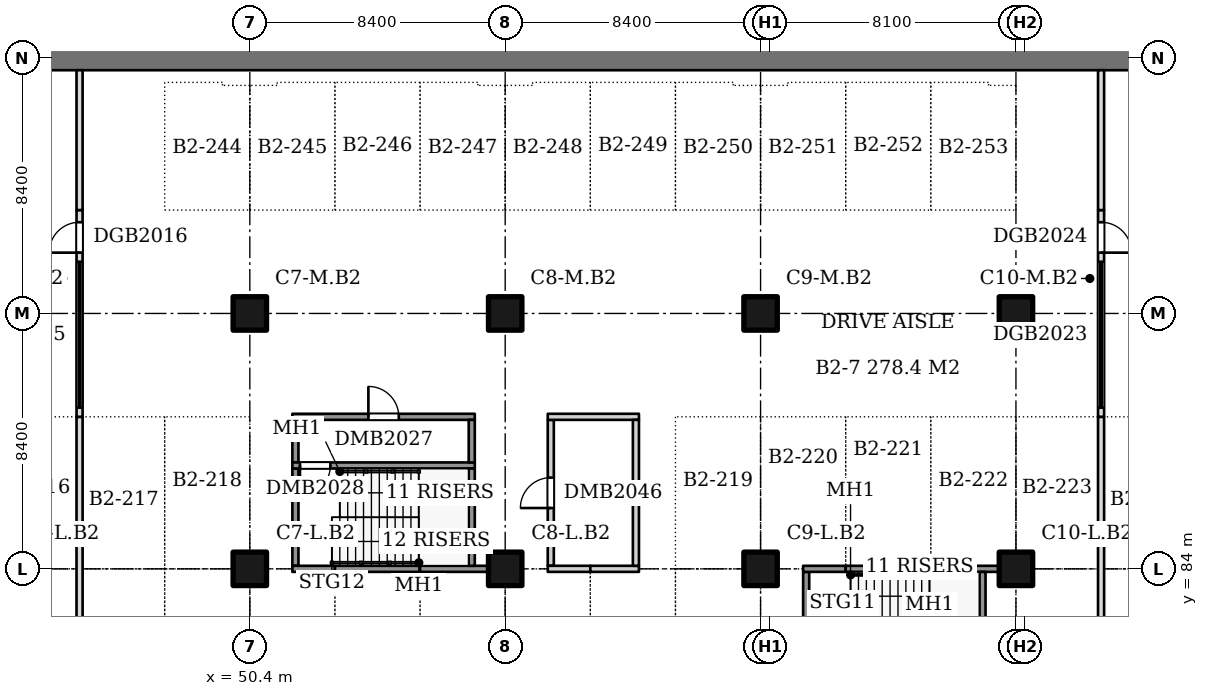
"""IFC4 building model, lengths in metres.
Left out: names, types, materials, properties, quantities, classifications, styles, units other than length and angle.
Written with IfcOpenShell. Run it as: python <this file> out.ifc"""

import sys

from ifc_helpers import new_model, si_unit, direction, frame, frame_2d, origin, origin_2d, place, context, subcontext, project, spatial, rectangle, extrude, element, fill, save


model = new_model("IFC4")
c1 = context("Model", 3, precision=1e-05, world=origin(), true_north=direction((0.0, 1.0)))
c2 = subcontext(c1, "Body", "Model", "MODEL_VIEW")
j1 = project(units=[si_unit("LENGTHUNIT", "METRE"), si_unit("PLANEANGLEUNIT", "RADIAN")], contexts=[c1])
p1 = place(None, origin())
s1 = spatial("IfcSite", under=j1, at=p1, CompositionType="ELEMENT")
p2 = place(p1, origin())
s2 = spatial("IfcBuilding", under=s1, at=p2, CompositionType="ELEMENT")
p3 = place(p2, frame((0.0, 0.0, -8.0)))
s3 = spatial("IfcBuildingStorey", under=s2, at=p3, CompositionType="ELEMENT", Elevation=-8.0)
p4 = place(p3, frame((-8.8, 100.8, 0.0), z_axis=(0.0, 0.0, 1.0), x_axis=(1.0, 0.0, 0.0)))
e1 = element("IfcWall", 1, at=p4, inside=s3, PredefinedType="SOLIDWALL", context=c2, shape_type="SweptSolid", body=[
    extrude(rectangle(XDim=135.2, YDim=0.8, at=frame_2d((67.6, 0.0))), origin(), (0.0, 0.0, 1.0), 3.7),
])
for number, where, z_axis, x_axis in (
    (2, (50.4, 84.0, 0.0), (0.0, 0.0, 1.0), (1.0, 0.0, 0.0)),
    (3, (50.4, 92.4, 0.0), (0.0, 0.0, 1.0), (1.0, 0.0, 0.0)),
    (4, (58.8, 84.0, 0.0), (0.0, 0.0, 1.0), (1.0, 0.0, 0.0)),
    (5, (58.8, 92.4, 0.0), (0.0, 0.0, 1.0), (1.0, 0.0, 0.0)),
    (6, (67.2, 84.0, 0.0), (0.0, 0.0, 1.0), (1.0, 0.0, 0.0)),
    (7, (67.2, 92.4, 0.0), (0.0, 0.0, 1.0), (1.0, 0.0, 0.0)),
    (8, (75.6, 84.0, 0.0), (0.0, 0.0, 1.0), (1.0, 0.0, 0.0)),
    (9, (75.6, 92.4, 0.0), (0.0, 0.0, 1.0), (1.0, 0.0, 0.0)),
):
    element("IfcColumn", number, at=place(p3, frame(where, z_axis=z_axis, x_axis=x_axis)), inside=s3, PredefinedType="COLUMN", context=c2, shape_type="SweptSolid", body=[
        extrude(rectangle(XDim=1.1, YDim=1.1, at=origin_2d()), origin(), (0.0, 0.0, 1.0), 3.7),
    ])
p5 = place(p3, frame((51.9, 84.1, 0.0), z_axis=(0.0, 0.0, 1.0), x_axis=(0.0, 1.0, 0.0)))
e10 = element("IfcWall", 10, at=p5, inside=s3, PredefinedType="SOLIDWALL", context=c2, shape_type="SweptSolid", body=[
    extrude(rectangle(XDim=3.2, YDim=0.2, at=frame_2d((1.6, 0.0))), origin(), (0.0, 0.0, 1.0), 3.7),
])
for number, where, z_axis, x_axis in (
    (11, (51.8, 84.0, 0.0), (0.0, 0.0, 1.0), (1.0, 0.0, 0.0)),
    (12, (51.9, 87.5, 0.0), (0.0, 0.0, 1.0), (0.0, 1.0, 0.0)),
):
    element("IfcWall", number, at=place(p3, frame(where, z_axis=z_axis, x_axis=x_axis)), inside=s3, PredefinedType="SOLIDWALL", context=c2, shape_type="SweptSolid", body=[
        extrude(rectangle(XDim=1.4, YDim=0.2, at=frame_2d((0.7, 0.0))), origin(), (0.0, 0.0, 1.0), 3.7),
    ])
p6 = place(p3, frame((51.8, 87.4, 0.0), z_axis=(0.0, 0.0, 1.0), x_axis=(1.0, 0.0, 0.0)))
e13 = element("IfcWall", 13, at=p6, inside=s3, PredefinedType="SOLIDWALL", context=c2, shape_type="SweptSolid", body=[
    extrude(rectangle(XDim=6.0, YDim=0.2, at=frame_2d((3.0, 0.0))), origin(), (0.0, 0.0, 1.0), 3.7),
])
p7 = place(p6, frame((0.25, 0.0, 0.0)))
e14 = element("IfcOpeningElement", 14, at=p7, cuts=e13, PredefinedType="OPENING", context=c2, shape_type="SweptSolid", body=[
    extrude(rectangle(XDim=1.0, YDim=2.1, at=frame_2d((0.5, 1.05))), frame((0.0, 0.11, 0.0), z_axis=(0.0, -1.0, 0.0), x_axis=(1.0, 0.0, 0.0)), (0.0, 0.0, 1.0), 0.22),
])
p8 = place(p3, frame((51.8, 89.0, 0.0), z_axis=(0.0, 0.0, 1.0), x_axis=(1.0, 0.0, 0.0)))
e15 = element("IfcWall", 15, at=p8, inside=s3, PredefinedType="SOLIDWALL", context=c2, shape_type="SweptSolid", body=[
    extrude(rectangle(XDim=6.0, YDim=0.2, at=frame_2d((3.0, 0.0))), origin(), (0.0, 0.0, 1.0), 3.7),
])
p9 = place(p8, frame((2.5, 0.0, 0.0)))
e16 = element("IfcOpeningElement", 16, at=p9, cuts=e15, PredefinedType="OPENING", context=c2, shape_type="SweptSolid", body=[
    extrude(rectangle(XDim=1.0, YDim=2.1, at=frame_2d((0.5, 1.05))), frame((0.0, 0.11, 0.0), z_axis=(0.0, -1.0, 0.0), x_axis=(1.0, 0.0, 0.0)), (0.0, 0.0, 1.0), 0.22),
])
p10 = place(p3, frame((53.2, 84.0, 0.0), z_axis=(0.0, 0.0, 1.0), x_axis=(1.0, 0.0, 0.0)))
e17 = element("IfcWall", 17, at=p10, inside=s3, PredefinedType="SOLIDWALL", context=c2, shape_type="SweptSolid", body=[
    extrude(rectangle(XDim=2.8, YDim=0.2, at=frame_2d((1.4, 0.0))), origin(), (0.0, 0.0, 1.0), 3.7),
])
p11 = place(p3, frame((56.0, 84.0, 0.0), z_axis=(0.0, 0.0, 1.0), x_axis=(1.0, 0.0, 0.0)))
e18 = element("IfcWall", 18, at=p11, inside=s3, PredefinedType="SOLIDWALL", context=c2, shape_type="SweptSolid", body=[
    extrude(rectangle(XDim=2.25, YDim=0.2, at=frame_2d((1.125, 0.0))), origin(), (0.0, 0.0, 1.0), 3.7),
])
p12 = place(p3, frame((57.7, 84.1, 0.0), z_axis=(0.0, 0.0, 1.0), x_axis=(0.0, 1.0, 0.0)))
e19 = element("IfcWall", 19, at=p12, inside=s3, PredefinedType="SOLIDWALL", context=c2, shape_type="SweptSolid", body=[
    extrude(rectangle(XDim=3.2, YDim=0.2, at=frame_2d((1.6, 0.0))), origin(), (0.0, 0.0, 1.0), 3.7),
])
p13 = place(p3, frame((57.7, 87.5, 0.0), z_axis=(0.0, 0.0, 1.0), x_axis=(0.0, 1.0, 0.0)))
e20 = element("IfcWall", 20, at=p13, inside=s3, PredefinedType="SOLIDWALL", context=c2, shape_type="SweptSolid", body=[
    extrude(rectangle(XDim=1.4, YDim=0.2, at=frame_2d((0.7, 0.0))), origin(), (0.0, 0.0, 1.0), 3.7),
])
p14 = place(p3, frame((60.3, 84.1, 0.0), z_axis=(0.0, 0.0, 1.0), x_axis=(0.0, 1.0, 0.0)))
e21 = element("IfcWall", 21, at=p14, inside=s3, PredefinedType="PARTITIONING", context=c2, shape_type="SweptSolid", body=[
    extrude(rectangle(XDim=4.8, YDim=0.2, at=frame_2d((2.4, 0.0))), origin(), (0.0, 0.0, 1.0), 3.7),
])
p15 = place(p14, frame((1.9, 0.0, 0.0)))
e22 = element("IfcOpeningElement", 22, at=p15, cuts=e21, PredefinedType="OPENING", context=c2, shape_type="SweptSolid", body=[
    extrude(rectangle(XDim=1.0, YDim=2.1, at=frame_2d((0.5, 1.05))), frame((0.0, 0.11, 0.0), z_axis=(0.0, -1.0, 0.0), x_axis=(1.0, 0.0, 0.0)), (0.0, 0.0, 1.0), 0.22),
])
p16 = place(p3, frame((60.2, 84.0, 0.0), z_axis=(0.0, 0.0, 1.0), x_axis=(1.0, 0.0, 0.0)))
e23 = element("IfcWall", 23, at=p16, inside=s3, PredefinedType="PARTITIONING", context=c2, shape_type="SweptSolid", body=[
    extrude(rectangle(XDim=1.4, YDim=0.2, at=frame_2d((0.7, 0.0))), origin(), (0.0, 0.0, 1.0), 3.7),
])
p17 = place(p3, frame((60.2, 89.0, 0.0), z_axis=(0.0, 0.0, 1.0), x_axis=(1.0, 0.0, 0.0)))
e24 = element("IfcWall", 24, at=p17, inside=s3, PredefinedType="PARTITIONING", context=c2, shape_type="SweptSolid", body=[
    extrude(rectangle(XDim=3.0, YDim=0.2, at=frame_2d((1.5, 0.0))), origin(), (0.0, 0.0, 1.0), 3.7),
])
p18 = place(p3, frame((61.6, 84.0, 0.0), z_axis=(0.0, 0.0, 1.0), x_axis=(1.0, 0.0, 0.0)))
e25 = element("IfcWall", 25, at=p18, inside=s3, PredefinedType="PARTITIONING", context=c2, shape_type="SweptSolid", body=[
    extrude(rectangle(XDim=1.6, YDim=0.2, at=frame_2d((0.8, 0.0))), origin(), (0.0, 0.0, 1.0), 3.7),
])
p19 = place(p3, frame((63.1, 84.1, 0.0), z_axis=(0.0, 0.0, 1.0), x_axis=(0.0, 1.0, 0.0)))
e26 = element("IfcWall", 26, at=p19, inside=s3, PredefinedType="PARTITIONING", context=c2, shape_type="SweptSolid", body=[
    extrude(rectangle(XDim=4.8, YDim=0.2, at=frame_2d((2.4, 0.0))), origin(), (0.0, 0.0, 1.0), 3.7),
])
p20 = place(p3, frame((68.7, 80.7, 0.0), z_axis=(0.0, 0.0, 1.0), x_axis=(0.0, 1.0, 0.0)))
e27 = element("IfcWall", 27, at=p20, inside=s3, PredefinedType="SOLIDWALL", context=c2, shape_type="SweptSolid", body=[
    extrude(rectangle(XDim=3.2, YDim=0.2, at=frame_2d((1.6, 0.0))), origin(), (0.0, 0.0, 1.0), 3.7),
])
p21 = place(p3, frame((68.6, 84.0, 0.0), z_axis=(0.0, 0.0, 1.0), x_axis=(1.0, 0.0, 0.0)))
e28 = element("IfcWall", 28, at=p21, inside=s3, PredefinedType="SOLIDWALL", context=c2, shape_type="SweptSolid", body=[
    extrude(rectangle(XDim=1.4, YDim=0.2, at=frame_2d((0.7, 0.0))), origin(), (0.0, 0.0, 1.0), 3.7),
])
p22 = place(p3, frame((70.0, 84.0, 0.0), z_axis=(0.0, 0.0, 1.0), x_axis=(1.0, 0.0, 0.0)))
e29 = element("IfcWall", 29, at=p22, inside=s3, PredefinedType="SOLIDWALL", context=c2, shape_type="SweptSolid", body=[
    extrude(rectangle(XDim=2.8, YDim=0.2, at=frame_2d((1.4, 0.0))), origin(), (0.0, 0.0, 1.0), 3.7),
])
p23 = place(p3, frame((72.8, 84.0, 0.0), z_axis=(0.0, 0.0, 1.0), x_axis=(1.0, 0.0, 0.0)))
e30 = element("IfcWall", 30, at=p23, inside=s3, PredefinedType="SOLIDWALL", context=c2, shape_type="SweptSolid", body=[
    extrude(rectangle(XDim=2.25, YDim=0.2, at=frame_2d((1.125, 0.0))), origin(), (0.0, 0.0, 1.0), 3.7),
])
p24 = place(p3, frame((74.5, 80.7, 0.0), z_axis=(0.0, 0.0, 1.0), x_axis=(0.0, 1.0, 0.0)))
e31 = element("IfcWall", 31, at=p24, inside=s3, PredefinedType="SOLIDWALL", context=c2, shape_type="SweptSolid", body=[
    extrude(rectangle(XDim=3.2, YDim=0.2, at=frame_2d((1.6, 0.0))), origin(), (0.0, 0.0, 1.0), 3.7),
])
p25 = place(p3, frame((44.8, 79.0, 0.0), z_axis=(0.0, 0.0, 1.0), x_axis=(0.0, 1.0, 0.0)))
e32 = element("IfcWall", 32, at=p25, inside=s3, PredefinedType="PARTITIONING", context=c2, shape_type="SweptSolid", body=[
    extrude(rectangle(XDim=10.0, YDim=0.2, at=frame_2d((5.0, 0.0))), origin(), (0.0, 0.0, 1.0), 3.7),
])
p26 = place(p3, frame((44.8, 89.0, 0.0), z_axis=(0.0, 0.0, 1.0), x_axis=(0.0, 1.0, 0.0)))
e33 = element("IfcWall", 33, at=p26, inside=s3, PredefinedType="PARTITIONING", context=c2, shape_type="SweptSolid", body=[
    extrude(rectangle(XDim=6.8, YDim=0.2, at=frame_2d((3.4, 0.0))), origin(), (0.0, 0.0, 1.0), 3.7),
])
p27 = place(p26, frame((0.3, 0.0, 0.0)))
e34 = element("IfcOpeningElement", 34, at=p27, cuts=e33, PredefinedType="OPENING", context=c2, shape_type="SweptSolid", body=[
    extrude(rectangle(XDim=4.8, YDim=2.4, at=frame_2d((2.4, 1.2))), frame((0.0, 0.11, 0.0), z_axis=(0.0, -1.0, 0.0), x_axis=(1.0, 0.0, 0.0)), (0.0, 0.0, 1.0), 0.22),
])
p28 = place(p26, frame((5.4, 0.0, 0.0)))
e35 = element("IfcOpeningElement", 35, at=p28, cuts=e33, PredefinedType="OPENING", context=c2, shape_type="SweptSolid", body=[
    extrude(rectangle(XDim=1.0, YDim=2.1, at=frame_2d((0.5, 1.05))), frame((0.0, 0.11, 0.0), z_axis=(0.0, -1.0, 0.0), x_axis=(1.0, 0.0, 0.0)), (0.0, 0.0, 1.0), 0.22),
])
p29 = place(p3, frame((44.8, 95.8, 0.0), z_axis=(0.0, 0.0, 1.0), x_axis=(0.0, 1.0, 0.0)))
e36 = element("IfcWall", 36, at=p29, inside=s3, PredefinedType="PARTITIONING", context=c2, shape_type="SweptSolid", body=[
    extrude(rectangle(XDim=4.6, YDim=0.2, at=frame_2d((2.3, 0.0))), origin(), (0.0, 0.0, 1.0), 3.7),
])
p30 = place(p3, frame((78.4, 79.0, 0.0), z_axis=(0.0, 0.0, 1.0), x_axis=(0.0, 1.0, 0.0)))
e37 = element("IfcWall", 37, at=p30, inside=s3, PredefinedType="PARTITIONING", context=c2, shape_type="SweptSolid", body=[
    extrude(rectangle(XDim=10.0, YDim=0.2, at=frame_2d((5.0, 0.0))), origin(), (0.0, 0.0, 1.0), 3.7),
])
p31 = place(p3, frame((78.4, 89.0, 0.0), z_axis=(0.0, 0.0, 1.0), x_axis=(0.0, 1.0, 0.0)))
e38 = element("IfcWall", 38, at=p31, inside=s3, PredefinedType="PARTITIONING", context=c2, shape_type="SweptSolid", body=[
    extrude(rectangle(XDim=6.8, YDim=0.2, at=frame_2d((3.4, 0.0))), origin(), (0.0, 0.0, 1.0), 3.7),
])
p32 = place(p31, frame((0.3, 0.0, 0.0)))
e39 = element("IfcOpeningElement", 39, at=p32, cuts=e38, PredefinedType="OPENING", context=c2, shape_type="SweptSolid", body=[
    extrude(rectangle(XDim=4.8, YDim=2.4, at=frame_2d((2.4, 1.2))), frame((0.0, 0.11, 0.0), z_axis=(0.0, -1.0, 0.0), x_axis=(1.0, 0.0, 0.0)), (0.0, 0.0, 1.0), 0.22),
])
p33 = place(p31, frame((5.4, 0.0, 0.0)))
e40 = element("IfcOpeningElement", 40, at=p33, cuts=e38, PredefinedType="OPENING", context=c2, shape_type="SweptSolid", body=[
    extrude(rectangle(XDim=1.0, YDim=2.1, at=frame_2d((0.5, 1.05))), frame((0.0, 0.11, 0.0), z_axis=(0.0, -1.0, 0.0), x_axis=(1.0, 0.0, 0.0)), (0.0, 0.0, 1.0), 0.22),
])
p34 = place(p3, frame((78.4, 95.8, 0.0), z_axis=(0.0, 0.0, 1.0), x_axis=(0.0, 1.0, 0.0)))
e41 = element("IfcWall", 41, at=p34, inside=s3, PredefinedType="PARTITIONING", context=c2, shape_type="SweptSolid", body=[
    extrude(rectangle(XDim=4.6, YDim=0.2, at=frame_2d((2.3, 0.0))), origin(), (0.0, 0.0, 1.0), 3.7),
])
p35 = place(p9, origin())
e42 = element("IfcDoor", 42, at=p35, inside=s3, OperationType="SINGLE_SWING_LEFT", PredefinedType="DOOR", context=c2, shape_type="SweptSolid", body=[
    extrude(rectangle(XDim=1.0, YDim=2.1, at=frame_2d((0.5, 1.05))), frame((0.0, 0.025, 0.0), z_axis=(0.0, -1.0, 0.0), x_axis=(1.0, 0.0, 0.0)), (0.0, 0.0, 1.0), 0.05),
])
fill(e16, e42)
p36 = place(p7, frame((1.0, 0.0, 0.0), z_axis=(0.0, 0.0, 1.0), x_axis=(-1.0, 0.0, 0.0)))
e43 = element("IfcDoor", 43, at=p36, inside=s3, OperationType="SINGLE_SWING_RIGHT", PredefinedType="DOOR", context=c2, shape_type="SweptSolid", body=[
    extrude(rectangle(XDim=1.0, YDim=2.1, at=frame_2d((0.5, 1.05))), frame((0.0, 0.025, 0.0), z_axis=(0.0, -1.0, 0.0), x_axis=(1.0, 0.0, 0.0)), (0.0, 0.0, 1.0), 0.05),
])
fill(e14, e43)
p37 = place(p15, origin())
e44 = element("IfcDoor", 44, at=p37, inside=s3, OperationType="SINGLE_SWING_LEFT", PredefinedType="DOOR", context=c2, shape_type="SweptSolid", body=[
    extrude(rectangle(XDim=1.0, YDim=2.1, at=frame_2d((0.5, 1.05))), frame((0.0, 0.025, 0.0), z_axis=(0.0, -1.0, 0.0), x_axis=(1.0, 0.0, 0.0)), (0.0, 0.0, 1.0), 0.05),
])
fill(e22, e44)
p38 = place(p27, origin())
e45 = element("IfcDoor", 45, at=p38, inside=s3, OperationType="ROLLINGUP", PredefinedType="GATE", context=c2, shape_type="SweptSolid", body=[
    extrude(rectangle(XDim=4.8, YDim=2.4, at=frame_2d((2.4, 1.2))), frame((0.0, 0.025, 0.0), z_axis=(0.0, -1.0, 0.0), x_axis=(1.0, 0.0, 0.0)), (0.0, 0.0, 1.0), 0.05),
])
fill(e34, e45)
p39 = place(p28, origin())
e46 = element("IfcDoor", 46, at=p39, inside=s3, OperationType="SINGLE_SWING_LEFT", PredefinedType="DOOR", context=c2, shape_type="SweptSolid", body=[
    extrude(rectangle(XDim=1.0, YDim=2.1, at=frame_2d((0.5, 1.05))), frame((0.0, 0.025, 0.0), z_axis=(0.0, -1.0, 0.0), x_axis=(1.0, 0.0, 0.0)), (0.0, 0.0, 1.0), 0.05),
])
fill(e35, e46)
p40 = place(p32, origin())
e47 = element("IfcDoor", 47, at=p40, inside=s3, OperationType="ROLLINGUP", PredefinedType="GATE", context=c2, shape_type="SweptSolid", body=[
    extrude(rectangle(XDim=4.8, YDim=2.4, at=frame_2d((2.4, 1.2))), frame((0.0, 0.025, 0.0), z_axis=(0.0, -1.0, 0.0), x_axis=(1.0, 0.0, 0.0)), (0.0, 0.0, 1.0), 0.05),
])
fill(e39, e47)
p41 = place(p33, frame((1.0, 0.0, 0.0), z_axis=(0.0, 0.0, 1.0), x_axis=(-1.0, 0.0, 0.0)))
e48 = element("IfcDoor", 48, at=p41, inside=s3, OperationType="SINGLE_SWING_RIGHT", PredefinedType="DOOR", context=c2, shape_type="SweptSolid", body=[
    extrude(rectangle(XDim=1.0, YDim=2.1, at=frame_2d((0.5, 1.05))), frame((0.0, 0.025, 0.0), z_axis=(0.0, -1.0, 0.0), x_axis=(1.0, 0.0, 0.0)), (0.0, 0.0, 1.0), 0.05),
])
fill(e40, e48)
save(model, sys.argv[1])
